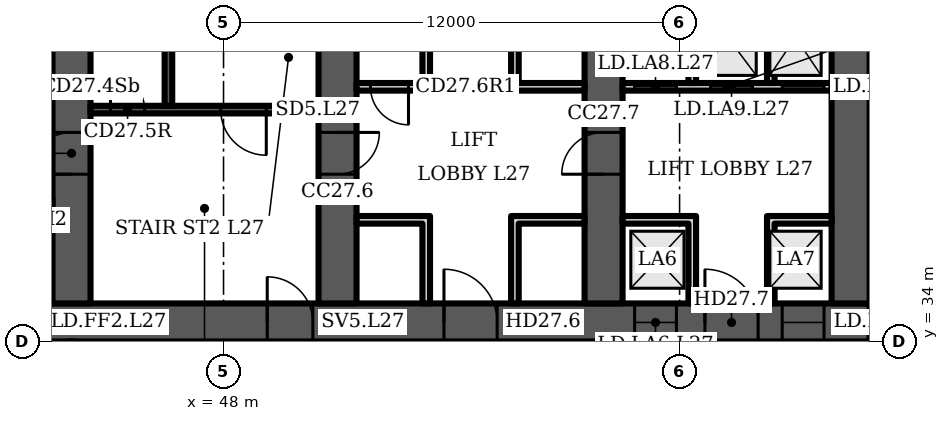
"""IFC4 building model, lengths in metres.
Left out: names, types, materials, properties, quantities, classifications, styles, units other than length and angle.
Written with IfcOpenShell. Run it as: python <this file> out.ifc"""

import sys

from ifc_helpers import new_model, si_unit, direction, frame, frame_2d, origin, place, context, subcontext, project, spatial, polyline, rectangle, outline, extrude, element, fill, save


model = new_model("IFC4")
c1 = context("Model", 3, precision=1e-05, world=origin(), true_north=direction((0.0, 1.0)))
c2 = subcontext(c1, "Body", "Model", "MODEL_VIEW")
j1 = project(units=[si_unit("LENGTHUNIT", "METRE"), si_unit("PLANEANGLEUNIT", "RADIAN")], contexts=[c1])
p1 = place(None, origin())
s1 = spatial("IfcSite", under=j1, at=p1, CompositionType="ELEMENT")
p2 = place(p1, origin())
s2 = spatial("IfcBuilding", under=s1, at=p2, CompositionType="ELEMENT")
p3 = place(p2, frame((0.0, 0.0, 118.3)))
s3 = spatial("IfcBuildingStorey", under=s2, at=p3, CompositionType="ELEMENT", Elevation=118.3)
p4 = place(p3, frame((16.0, 34.5, 0.0), z_axis=(0.0, 0.0, 1.0), x_axis=(1.0, 0.0, 0.0)))
e1 = element("IfcWall", 1, at=p4, inside=s3, PredefinedType="SHEAR", context=c2, shape_type="SweptSolid", body=[
    extrude(rectangle(XDim=49.0, YDim=1.0, at=frame_2d((24.5, 0.0))), origin(), (0.0, 0.0, 1.0), 3.6),
])
p5 = place(p4, frame((1.2, 0.0, 0.0)))
e2 = element("IfcOpeningElement", 2, at=p5, cuts=e1, PredefinedType="OPENING", context=c2, shape_type="SweptSolid", body=[
    extrude(rectangle(XDim=1.1, YDim=2.1, at=frame_2d((0.55, 1.05))), frame((0.0, 0.51, 0.0), z_axis=(0.0, -1.0, 0.0), x_axis=(1.0, 0.0, 0.0)), (0.0, 0.0, 1.0), 1.02),
])
p6 = place(p4, frame((5.083, 0.0, 0.0)))
e3 = element("IfcOpeningElement", 3, at=p6, cuts=e1, PredefinedType="OPENING", context=c2, shape_type="SweptSolid", body=[
    extrude(rectangle(XDim=1.1, YDim=2.1, at=frame_2d((0.55, 1.05))), frame((0.0, 0.51, 0.0), z_axis=(0.0, -1.0, 0.0), x_axis=(1.0, 0.0, 0.0)), (0.0, 0.0, 1.0), 1.02),
])
p7 = place(p4, frame((2.933, 0.0, 0.0)))
e4 = element("IfcOpeningElement", 4, at=p7, cuts=e1, PredefinedType="OPENING", context=c2, shape_type="SweptSolid", body=[
    extrude(rectangle(XDim=1.4, YDim=2.1, at=frame_2d((0.7, 1.05))), frame((0.0, 0.51, 0.0), z_axis=(0.0, -1.0, 0.0), x_axis=(1.0, 0.0, 0.0)), (0.0, 0.0, 1.0), 1.02),
])
p8 = place(p4, frame((7.65, 0.0, 0.0)))
e5 = element("IfcOpeningElement", 5, at=p8, cuts=e1, PredefinedType="OPENING", context=c2, shape_type="SweptSolid", body=[
    extrude(rectangle(XDim=1.2, YDim=2.1, at=frame_2d((0.6, 1.05))), frame((0.0, 0.51, 0.0), z_axis=(0.0, -1.0, 0.0), x_axis=(1.0, 0.0, 0.0)), (0.0, 0.0, 1.0), 1.02),
])
p9 = place(p4, frame((14.817, 0.0, 0.0)))
e6 = element("IfcOpeningElement", 6, at=p9, cuts=e1, PredefinedType="OPENING", context=c2, shape_type="SweptSolid", body=[
    extrude(rectangle(XDim=1.1, YDim=2.1, at=frame_2d((0.55, 1.05))), frame((0.0, 0.51, 0.0), z_axis=(0.0, -1.0, 0.0), x_axis=(1.0, 0.0, 0.0)), (0.0, 0.0, 1.0), 1.02),
])
p10 = place(p4, frame((19.083, 0.0, 0.0)))
e7 = element("IfcOpeningElement", 7, at=p10, cuts=e1, PredefinedType="OPENING", context=c2, shape_type="SweptSolid", body=[
    extrude(rectangle(XDim=1.1, YDim=2.1, at=frame_2d((0.55, 1.05))), frame((0.0, 0.51, 0.0), z_axis=(0.0, -1.0, 0.0), x_axis=(1.0, 0.0, 0.0)), (0.0, 0.0, 1.0), 1.02),
])
p11 = place(p4, frame((16.8, 0.0, 0.0)))
e8 = element("IfcOpeningElement", 8, at=p11, cuts=e1, PredefinedType="OPENING", context=c2, shape_type="SweptSolid", body=[
    extrude(rectangle(XDim=1.4, YDim=2.1, at=frame_2d((0.7, 1.05))), frame((0.0, 0.51, 0.0), z_axis=(0.0, -1.0, 0.0), x_axis=(1.0, 0.0, 0.0)), (0.0, 0.0, 1.0), 1.02),
])
p12 = place(p4, frame((21.817, 0.0, 0.0)))
e9 = element("IfcOpeningElement", 9, at=p12, cuts=e1, PredefinedType="OPENING", context=c2, shape_type="SweptSolid", body=[
    extrude(rectangle(XDim=1.1, YDim=2.1, at=frame_2d((0.55, 1.05))), frame((0.0, 0.51, 0.0), z_axis=(0.0, -1.0, 0.0), x_axis=(1.0, 0.0, 0.0)), (0.0, 0.0, 1.0), 1.02),
])
p13 = place(p4, frame((26.083, 0.0, 0.0)))
e10 = element("IfcOpeningElement", 10, at=p13, cuts=e1, PredefinedType="OPENING", context=c2, shape_type="SweptSolid", body=[
    extrude(rectangle(XDim=1.1, YDim=2.1, at=frame_2d((0.55, 1.05))), frame((0.0, 0.51, 0.0), z_axis=(0.0, -1.0, 0.0), x_axis=(1.0, 0.0, 0.0)), (0.0, 0.0, 1.0), 1.02),
])
p14 = place(p4, frame((33.15, 0.0, 0.0)))
e11 = element("IfcOpeningElement", 11, at=p14, cuts=e1, PredefinedType="OPENING", context=c2, shape_type="SweptSolid", body=[
    extrude(rectangle(XDim=1.2, YDim=2.1, at=frame_2d((0.6, 1.05))), frame((0.0, 0.51, 0.0), z_axis=(0.0, -1.0, 0.0), x_axis=(1.0, 0.0, 0.0)), (0.0, 0.0, 1.0), 1.02),
])
p15 = place(p4, frame((37.8, 0.0, 0.0)))
e12 = element("IfcOpeningElement", 12, at=p15, cuts=e1, PredefinedType="OPENING", context=c2, shape_type="SweptSolid", body=[
    extrude(rectangle(XDim=1.4, YDim=2.1, at=frame_2d((0.7, 1.05))), frame((0.0, 0.51, 0.0), z_axis=(0.0, -1.0, 0.0), x_axis=(1.0, 0.0, 0.0)), (0.0, 0.0, 1.0), 1.02),
])
p16 = place(p4, frame((42.817, 0.0, 0.0)))
e13 = element("IfcOpeningElement", 13, at=p16, cuts=e1, PredefinedType="OPENING", context=c2, shape_type="SweptSolid", body=[
    extrude(rectangle(XDim=1.1, YDim=2.1, at=frame_2d((0.55, 1.05))), frame((0.0, 0.51, 0.0), z_axis=(0.0, -1.0, 0.0), x_axis=(1.0, 0.0, 0.0)), (0.0, 0.0, 1.0), 1.02),
])
p17 = place(p4, frame((46.7, 0.0, 0.0)))
e14 = element("IfcOpeningElement", 14, at=p17, cuts=e1, PredefinedType="OPENING", context=c2, shape_type="SweptSolid", body=[
    extrude(rectangle(XDim=1.1, YDim=2.1, at=frame_2d((0.55, 1.05))), frame((0.0, 0.51, 0.0), z_axis=(0.0, -1.0, 0.0), x_axis=(1.0, 0.0, 0.0)), (0.0, 0.0, 1.0), 1.02),
])
p18 = place(p4, frame((44.667, 0.0, 0.0)))
e15 = element("IfcOpeningElement", 15, at=p18, cuts=e1, PredefinedType="OPENING", context=c2, shape_type="SweptSolid", body=[
    extrude(rectangle(XDim=1.4, YDim=2.1, at=frame_2d((0.7, 1.05))), frame((0.0, 0.51, 0.0), z_axis=(0.0, -1.0, 0.0), x_axis=(1.0, 0.0, 0.0)), (0.0, 0.0, 1.0), 1.02),
])
p19 = place(p3, frame((44.0, 35.0, 0.0), z_axis=(0.0, 0.0, 1.0), x_axis=(0.0, 1.0, 0.0)))
e16 = element("IfcWall", 16, at=p19, inside=s3, PredefinedType="SHEAR", context=c2, shape_type="SweptSolid", body=[
    extrude(rectangle(XDim=14.577, YDim=1.0, at=frame_2d((7.289, 0.0))), origin(), (0.0, 0.0, 1.0), 3.6),
])
p20 = place(p19, frame((3.4, 0.0, 0.0)))
e17 = element("IfcOpeningElement", 17, at=p20, cuts=e16, PredefinedType="OPENING", context=c2, shape_type="SweptSolid", body=[
    extrude(rectangle(XDim=1.1, YDim=2.1, at=frame_2d((0.55, 1.05))), frame((0.0, 0.51, 0.0), z_axis=(0.0, -1.0, 0.0), x_axis=(1.0, 0.0, 0.0)), (0.0, 0.0, 1.0), 1.02),
])
p21 = place(p19, frame((9.8, 0.0, 0.0)))
e18 = element("IfcOpeningElement", 18, at=p21, cuts=e16, PredefinedType="OPENING", context=c2, shape_type="SweptSolid", body=[
    extrude(rectangle(XDim=1.0, YDim=2.1, at=frame_2d((0.5, 1.05))), frame((0.0, 0.51, 0.0), z_axis=(0.0, -1.0, 0.0), x_axis=(1.0, 0.0, 0.0)), (0.0, 0.0, 1.0), 1.02),
])
p22 = place(p3, frame((51.0, 35.0, 0.0), z_axis=(0.0, 0.0, 1.0), x_axis=(0.0, 1.0, 0.0)))
e19 = element("IfcWall", 19, at=p22, inside=s3, PredefinedType="SHEAR", context=c2, shape_type="SweptSolid", body=[
    extrude(rectangle(XDim=13.965, YDim=1.0, at=frame_2d((6.982, 0.0))), origin(), (0.0, 0.0, 1.0), 3.6),
])
p23 = place(p22, frame((3.4, 0.0, 0.0)))
e20 = element("IfcOpeningElement", 20, at=p23, cuts=e19, PredefinedType="OPENING", context=c2, shape_type="SweptSolid", body=[
    extrude(rectangle(XDim=1.1, YDim=2.1, at=frame_2d((0.55, 1.05))), frame((0.0, 0.51, 0.0), z_axis=(0.0, -1.0, 0.0), x_axis=(1.0, 0.0, 0.0)), (0.0, 0.0, 1.0), 1.02),
])
p24 = place(p3, frame((58.0, 35.0, 0.0), z_axis=(0.0, 0.0, 1.0), x_axis=(0.0, 1.0, 0.0)))
e21 = element("IfcWall", 21, at=p24, inside=s3, PredefinedType="SHEAR", context=c2, shape_type="SweptSolid", body=[
    extrude(rectangle(XDim=13.352, YDim=1.0, at=frame_2d((6.676, 0.0))), origin(), (0.0, 0.0, 1.0), 3.6),
])
p25 = place(p24, frame((10.426, 0.0, 0.0)))
e22 = element("IfcOpeningElement", 22, at=p25, cuts=e21, PredefinedType="OPENING", context=c2, shape_type="SweptSolid", body=[
    extrude(rectangle(XDim=1.0, YDim=2.1, at=frame_2d((0.5, 1.05))), frame((0.0, 0.51, 0.0), z_axis=(0.0, -1.0, 0.0), x_axis=(1.0, 0.0, 0.0)), (0.0, 0.0, 1.0), 1.02),
])
p26 = place(p24, frame((3.4, 0.0, 0.0)))
e23 = element("IfcOpeningElement", 23, at=p26, cuts=e21, PredefinedType="OPENING", context=c2, shape_type="SweptSolid", body=[
    extrude(rectangle(XDim=1.1, YDim=2.1, at=frame_2d((0.55, 1.05))), frame((0.0, 0.51, 0.0), z_axis=(0.0, -1.0, 0.0), x_axis=(1.0, 0.0, 0.0)), (0.0, 0.0, 1.0), 1.02),
])
p27 = place(p3, frame((64.5, 35.0, 0.0), z_axis=(0.0, 0.0, 1.0), x_axis=(0.0, 1.0, 0.0)))
e24 = element("IfcWall", 24, at=p27, inside=s3, PredefinedType="SHEAR", context=c2, shape_type="SweptSolid", body=[
    extrude(rectangle(XDim=12.784, YDim=1.0, at=frame_2d((6.392, 0.0))), origin(), (0.0, 0.0, 1.0), 3.6),
])
p28 = place(p3, frame((44.5, 40.1, 0.0), z_axis=(0.0, 0.0, 1.0), x_axis=(1.0, 0.0, 0.0)))
e25 = element("IfcWall", 25, at=p28, inside=s3, PredefinedType="SHEAR", context=c2, shape_type="SweptSolid", body=[
    extrude(rectangle(XDim=6.0, YDim=0.2, at=frame_2d((3.0, 0.0))), origin(), (0.0, 0.0, 1.0), 3.2),
])
p29 = place(p28, frame((3.425, 0.0, 0.0)))
e26 = element("IfcOpeningElement", 26, at=p29, cuts=e25, PredefinedType="OPENING", context=c2, shape_type="SweptSolid", body=[
    extrude(rectangle(XDim=1.2, YDim=2.1, at=frame_2d((0.6, 1.05))), frame((0.0, 0.11, 0.0), z_axis=(0.0, -1.0, 0.0), x_axis=(1.0, 0.0, 0.0)), (0.0, 0.0, 1.0), 0.22),
])
p30 = place(p28, frame((0.525, 0.0, 0.0)))
e27 = element("IfcOpeningElement", 27, at=p30, cuts=e25, PredefinedType="OPENING", context=c2, shape_type="SweptSolid", body=[
    extrude(rectangle(XDim=0.9, YDim=2.1, at=frame_2d((0.45, 1.05))), frame((0.0, 0.11, 0.0), z_axis=(0.0, -1.0, 0.0), x_axis=(1.0, 0.0, 0.0)), (0.0, 0.0, 1.0), 0.22),
])
p31 = place(p3, frame((46.55, 40.2, 0.0), z_axis=(0.0, 0.0, 1.0), x_axis=(0.0, 1.0, 0.0)))
e28 = element("IfcWall", 28, at=p31, inside=s3, PredefinedType="SHEAR", context=c2, shape_type="SweptSolid", body=[
    extrude(rectangle(XDim=7.2, YDim=0.2, at=frame_2d((3.6, 0.0))), origin(), (0.0, 0.0, 1.0), 3.2),
])
p32 = place(p3, frame((51.5, 40.7, 0.0), z_axis=(0.0, 0.0, 1.0), x_axis=(1.0, 0.0, 0.0)))
e29 = element("IfcWall", 29, at=p32, inside=s3, PredefinedType="PARTITIONING", context=c2, shape_type="SweptSolid", body=[
    extrude(rectangle(XDim=6.0, YDim=0.2, at=frame_2d((3.0, 0.0))), origin(), (0.0, 0.0, 1.0), 3.2),
])
p33 = place(p32, frame((0.367, 0.0, 0.0)))
e30 = element("IfcOpeningElement", 30, at=p33, cuts=e29, PredefinedType="OPENING", context=c2, shape_type="SweptSolid", body=[
    extrude(rectangle(XDim=1.0, YDim=2.1, at=frame_2d((0.5, 1.05))), frame((0.0, 0.11, 0.0), z_axis=(0.0, -1.0, 0.0), x_axis=(1.0, 0.0, 0.0)), (0.0, 0.0, 1.0), 0.22),
])
p34 = place(p3, frame((0.0, 0.0, -0.0)))
e31 = element("IfcWall", 31, at=p34, inside=s3, PredefinedType="PARTITIONING", context=c2, shape_type="SweptSolid", body=[
    extrude(outline(polyline([(53.233, 37.1), (51.5, 37.1), (51.5, 37.3), (53.233, 37.3), (53.433, 37.3), (53.433, 35.0), (53.233, 35.0), (53.233, 37.1)])), origin(), (0.0, 0.0, 1.0), 3.2),
])
p35 = place(p3, frame((0.0, 0.0, -0.0)))
e32 = element("IfcWall", 32, at=p35, inside=s3, PredefinedType="PARTITIONING", context=c2, shape_type="SweptSolid", body=[
    extrude(outline(polyline([(55.567, 37.3), (55.767, 37.3), (57.5, 37.3), (57.5, 37.1), (55.767, 37.1), (55.767, 35.0), (55.567, 35.0), (55.567, 37.3)])), origin(), (0.0, 0.0, 1.0), 3.2),
])
p36 = place(p3, frame((0.0, 0.0, -0.0)))
e33 = element("IfcWall", 33, at=p36, inside=s3, PredefinedType="PARTITIONING", context=c2, shape_type="SweptSolid", body=[
    extrude(outline(polyline([(53.233, 40.8), (53.233, 43.8), (53.433, 43.8), (53.433, 40.8), (53.233, 40.8)])), origin(), (0.0, 0.0, 1.0), 3.2),
])
p37 = place(p3, frame((0.0, 0.0, -0.0)))
e34 = element("IfcWall", 34, at=p37, inside=s3, PredefinedType="PARTITIONING", context=c2, shape_type="SweptSolid", body=[
    extrude(outline(polyline([(55.567, 40.8), (55.567, 43.8), (55.767, 43.8), (55.767, 40.8), (55.567, 40.8)])), origin(), (0.0, 0.0, 1.0), 3.2),
])
p38 = place(p3, frame((58.5, 40.7, 0.0), z_axis=(0.0, 0.0, 1.0), x_axis=(1.0, 0.0, 0.0)))
e35 = element("IfcWall", 35, at=p38, inside=s3, PredefinedType="PARTITIONING", context=c2, shape_type="SweptSolid", body=[
    extrude(rectangle(XDim=5.5, YDim=0.2, at=frame_2d((2.75, 0.0))), origin(), (0.0, 0.0, 1.0), 3.2),
])
p39 = place(p38, frame((0.317, 0.0, 0.0)))
e36 = element("IfcOpeningElement", 36, at=p39, cuts=e35, PredefinedType="OPENING", context=c2, shape_type="SweptSolid", body=[
    extrude(rectangle(XDim=1.1, YDim=2.1, at=frame_2d((0.55, 1.05))), frame((0.0, 0.11, 0.0), z_axis=(0.0, -1.0, 0.0), x_axis=(1.0, 0.0, 0.0)), (0.0, 0.0, 1.0), 0.22),
])
p40 = place(p38, frame((2.317, 0.0, 0.0)))
e37 = element("IfcOpeningElement", 37, at=p40, cuts=e35, PredefinedType="OPENING", context=c2, shape_type="SweptSolid", body=[
    extrude(rectangle(XDim=1.1, YDim=2.1, at=frame_2d((0.55, 1.05))), frame((0.0, 0.11, 0.0), z_axis=(0.0, -1.0, 0.0), x_axis=(1.0, 0.0, 0.0)), (0.0, 0.0, 1.0), 0.22),
])
p41 = place(p38, frame((4.2, 0.0, 0.0)))
e38 = element("IfcOpeningElement", 38, at=p41, cuts=e35, PredefinedType="OPENING", context=c2, shape_type="SweptSolid", body=[
    extrude(rectangle(XDim=1.1, YDim=2.1, at=frame_2d((0.55, 1.05))), frame((0.0, 0.11, 0.0), z_axis=(0.0, -1.0, 0.0), x_axis=(1.0, 0.0, 0.0)), (0.0, 0.0, 1.0), 0.22),
])
p42 = place(p3, frame((0.0, 0.0, -0.0)))
e39 = element("IfcWall", 39, at=p42, inside=s3, PredefinedType="PARTITIONING", context=c2, shape_type="SweptSolid", body=[
    extrude(outline(polyline([(60.233, 37.1), (58.5, 37.1), (58.5, 37.3), (60.233, 37.3), (60.433, 37.3), (60.433, 35.0), (60.233, 35.0), (60.233, 37.1)])), origin(), (0.0, 0.0, 1.0), 3.2),
])
p43 = place(p3, frame((0.0, 0.0, -0.0)))
e40 = element("IfcWall", 40, at=p43, inside=s3, PredefinedType="PARTITIONING", context=c2, shape_type="SweptSolid", body=[
    extrude(outline(polyline([(62.3, 37.3), (62.5, 37.3), (64.0, 37.3), (64.0, 37.1), (62.5, 37.1), (62.5, 35.0), (62.3, 35.0), (62.3, 37.3)])), origin(), (0.0, 0.0, 1.0), 3.2),
])
p44 = place(p3, frame((0.0, 0.0, -0.0)))
e41 = element("IfcWall", 41, at=p44, inside=s3, PredefinedType="PARTITIONING", context=c2, shape_type="SweptSolid", body=[
    extrude(outline(polyline([(60.433, 40.8), (60.233, 40.8), (60.233, 43.8), (58.5, 43.8), (58.5, 44.0), (64.0, 44.0), (64.0, 43.8), (62.5, 43.8), (62.5, 40.8), (62.3, 40.8), (62.3, 43.8), (60.433, 43.8), (60.433, 40.8)])), origin(), (0.0, 0.0, 1.0), 3.2),
])
p45 = place(p29, origin())
e42 = element("IfcDoor", 42, at=p45, inside=s3, OperationType="SINGLE_SWING_RIGHT", PredefinedType="DOOR", context=c2, shape_type="SweptSolid", body=[
    extrude(rectangle(XDim=1.2, YDim=2.1, at=frame_2d((0.6, 1.05))), frame((0.0, 0.025, 0.0), z_axis=(0.0, -1.0, 0.0), x_axis=(1.0, 0.0, 0.0)), (0.0, 0.0, 1.0), 0.05),
])
fill(e26, e42)
p46 = place(p30, origin())
e43 = element("IfcDoor", 43, at=p46, inside=s3, OperationType="SINGLE_SWING_LEFT", PredefinedType="DOOR", context=c2, shape_type="SweptSolid", body=[
    extrude(rectangle(XDim=0.9, YDim=2.1, at=frame_2d((0.45, 1.05))), frame((0.0, 0.025, 0.0), z_axis=(0.0, -1.0, 0.0), x_axis=(1.0, 0.0, 0.0)), (0.0, 0.0, 1.0), 0.05),
])
fill(e27, e43)
p47 = place(p14, origin())
e44 = element("IfcDoor", 44, at=p47, inside=s3, OperationType="SINGLE_SWING_LEFT", PredefinedType="DOOR", context=c2, shape_type="SweptSolid", body=[
    extrude(rectangle(XDim=1.2, YDim=2.1, at=frame_2d((0.6, 1.05))), frame((0.0, 0.025, 0.0), z_axis=(0.0, -1.0, 0.0), x_axis=(1.0, 0.0, 0.0)), (0.0, 0.0, 1.0), 0.05),
])
fill(e11, e44)
p48 = place(p15, origin())
e45 = element("IfcDoor", 45, at=p48, inside=s3, OperationType="DOUBLE_DOOR_SINGLE_SWING", PredefinedType="DOOR", context=c2, shape_type="SweptSolid", body=[
    extrude(rectangle(XDim=1.4, YDim=2.1, at=frame_2d((0.7, 1.05))), frame((0.0, 0.025, 0.0), z_axis=(0.0, -1.0, 0.0), x_axis=(1.0, 0.0, 0.0)), (0.0, 0.0, 1.0), 0.05),
])
fill(e12, e45)
p49 = place(p33, origin())
e46 = element("IfcDoor", 46, at=p49, inside=s3, OperationType="SINGLE_SWING_RIGHT", PredefinedType="DOOR", context=c2, shape_type="SweptSolid", body=[
    extrude(rectangle(XDim=1.0, YDim=2.1, at=frame_2d((0.5, 1.05))), frame((0.0, 0.025, 0.0), z_axis=(0.0, -1.0, 0.0), x_axis=(1.0, 0.0, 0.0)), (0.0, 0.0, 1.0), 0.05),
])
fill(e30, e46)
p50 = place(p16, origin())
e47 = element("IfcDoor", 47, at=p50, inside=s3, OperationType="DOUBLE_DOOR_SLIDING", PredefinedType="DOOR", context=c2, shape_type="SweptSolid", body=[
    extrude(rectangle(XDim=1.1, YDim=2.1, at=frame_2d((0.55, 1.05))), frame((0.0, 0.025, 0.0), z_axis=(0.0, -1.0, 0.0), x_axis=(1.0, 0.0, 0.0)), (0.0, 0.0, 1.0), 0.05),
])
fill(e13, e47)
p51 = place(p17, origin())
e48 = element("IfcDoor", 48, at=p51, inside=s3, OperationType="DOUBLE_DOOR_SLIDING", PredefinedType="DOOR", context=c2, shape_type="SweptSolid", body=[
    extrude(rectangle(XDim=1.1, YDim=2.1, at=frame_2d((0.55, 1.05))), frame((0.0, 0.025, 0.0), z_axis=(0.0, -1.0, 0.0), x_axis=(1.0, 0.0, 0.0)), (0.0, 0.0, 1.0), 0.05),
])
fill(e14, e48)
p52 = place(p18, origin())
e49 = element("IfcDoor", 49, at=p52, inside=s3, OperationType="DOUBLE_DOOR_SINGLE_SWING", PredefinedType="DOOR", context=c2, shape_type="SweptSolid", body=[
    extrude(rectangle(XDim=1.4, YDim=2.1, at=frame_2d((0.7, 1.05))), frame((0.0, 0.025, 0.0), z_axis=(0.0, -1.0, 0.0), x_axis=(1.0, 0.0, 0.0)), (0.0, 0.0, 1.0), 0.05),
])
fill(e15, e49)
p53 = place(p39, origin())
e50 = element("IfcDoor", 50, at=p53, inside=s3, OperationType="DOUBLE_DOOR_SLIDING", PredefinedType="DOOR", context=c2, shape_type="SweptSolid", body=[
    extrude(rectangle(XDim=1.1, YDim=2.1, at=frame_2d((0.55, 1.05))), frame((0.0, 0.025, 0.0), z_axis=(0.0, -1.0, 0.0), x_axis=(1.0, 0.0, 0.0)), (0.0, 0.0, 1.0), 0.05),
])
fill(e36, e50)
p54 = place(p40, origin())
e51 = element("IfcDoor", 51, at=p54, inside=s3, OperationType="DOUBLE_DOOR_SLIDING", PredefinedType="DOOR", context=c2, shape_type="SweptSolid", body=[
    extrude(rectangle(XDim=1.1, YDim=2.1, at=frame_2d((0.55, 1.05))), frame((0.0, 0.025, 0.0), z_axis=(0.0, -1.0, 0.0), x_axis=(1.0, 0.0, 0.0)), (0.0, 0.0, 1.0), 0.05),
])
fill(e37, e51)
p55 = place(p41, origin())
e52 = element("IfcDoor", 52, at=p55, inside=s3, OperationType="DOUBLE_DOOR_SLIDING", PredefinedType="DOOR", context=c2, shape_type="SweptSolid", body=[
    extrude(rectangle(XDim=1.1, YDim=2.1, at=frame_2d((0.55, 1.05))), frame((0.0, 0.025, 0.0), z_axis=(0.0, -1.0, 0.0), x_axis=(1.0, 0.0, 0.0)), (0.0, 0.0, 1.0), 0.05),
])
fill(e38, e52)
p56 = place(p20, origin())
e53 = element("IfcDoor", 53, at=p56, inside=s3, OperationType="SINGLE_SWING_LEFT", PredefinedType="DOOR", context=c2, shape_type="SweptSolid", body=[
    extrude(rectangle(XDim=1.1, YDim=2.1, at=frame_2d((0.55, 1.05))), frame((0.0, 0.025, 0.0), z_axis=(0.0, -1.0, 0.0), x_axis=(1.0, 0.0, 0.0)), (0.0, 0.0, 1.0), 0.05),
])
fill(e17, e53)
p57 = place(p23, origin())
e54 = element("IfcDoor", 54, at=p57, inside=s3, OperationType="SINGLE_SWING_RIGHT", PredefinedType="DOOR", context=c2, shape_type="SweptSolid", body=[
    extrude(rectangle(XDim=1.1, YDim=2.1, at=frame_2d((0.55, 1.05))), frame((0.0, 0.025, 0.0), z_axis=(0.0, -1.0, 0.0), x_axis=(1.0, 0.0, 0.0)), (0.0, 0.0, 1.0), 0.05),
])
fill(e20, e54)
p58 = place(p26, origin())
e55 = element("IfcDoor", 55, at=p58, inside=s3, OperationType="SINGLE_SWING_LEFT", PredefinedType="DOOR", context=c2, shape_type="SweptSolid", body=[
    extrude(rectangle(XDim=1.1, YDim=2.1, at=frame_2d((0.55, 1.05))), frame((0.0, 0.025, 0.0), z_axis=(0.0, -1.0, 0.0), x_axis=(1.0, 0.0, 0.0)), (0.0, 0.0, 1.0), 0.05),
])
fill(e23, e55)
save(model, sys.argv[1])
